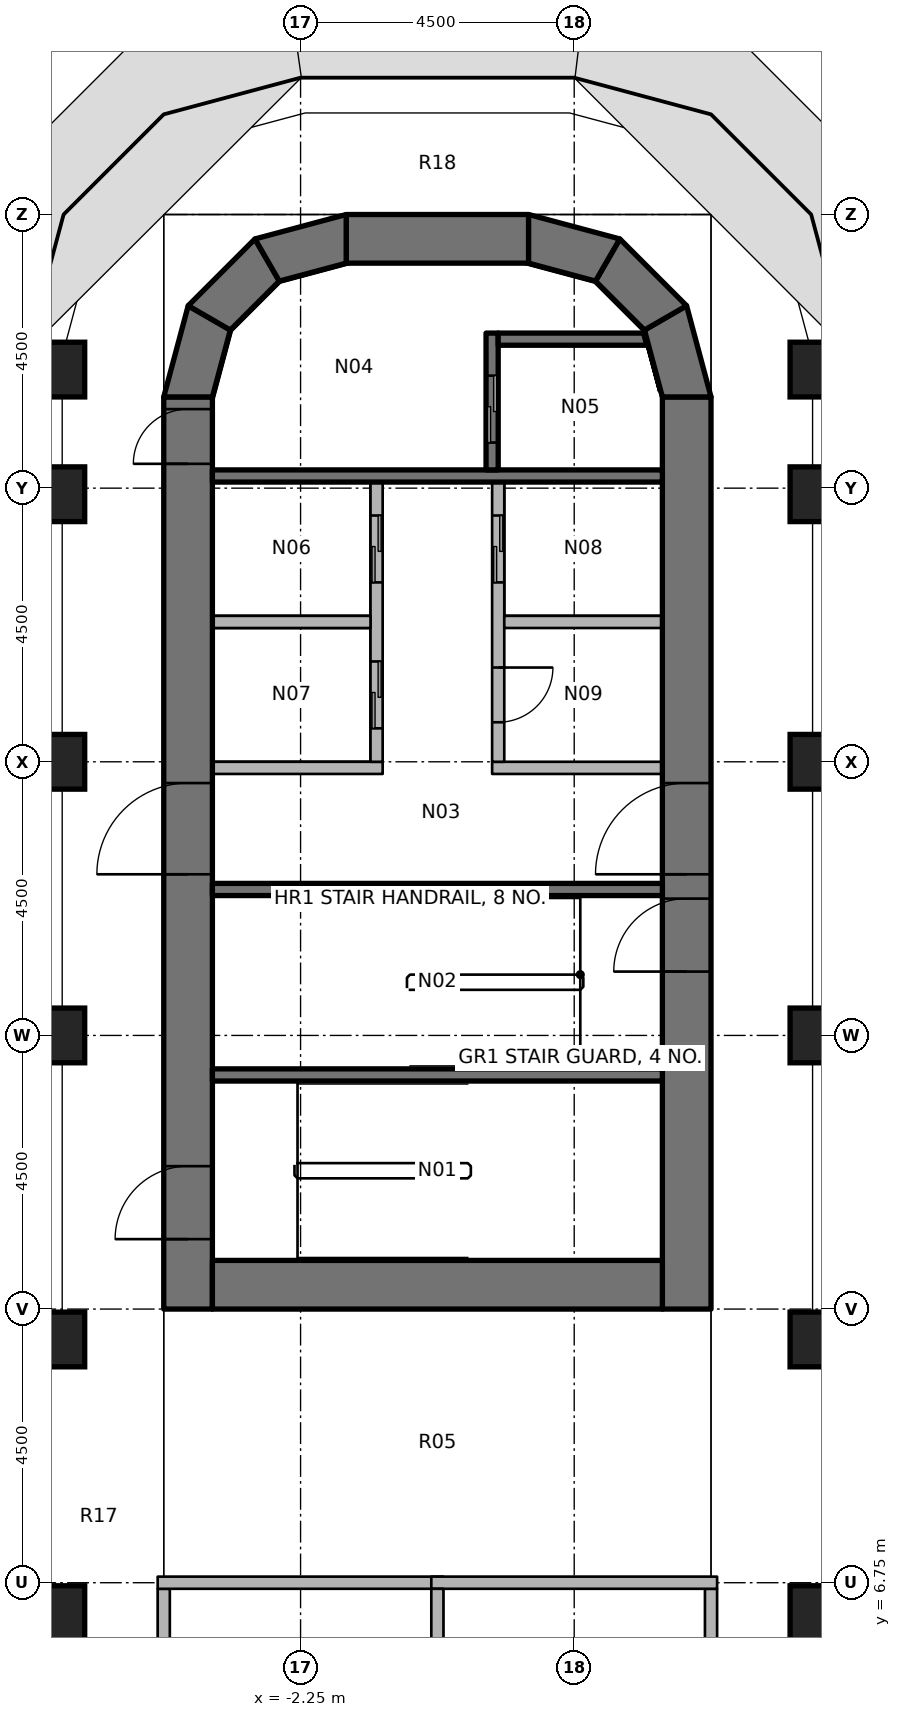
"""IFC4 building model, lengths in metres.
Left out: names, types, materials, properties, quantities, classifications, styles, units other than length and angle.
Written with IfcOpenShell. Run it as: python <this file> out.ifc"""

import sys

from ifc_helpers import new_model, si_unit, direction, frame, frame_2d, origin, origin_2d, place, context, subcontext, project, spatial, polyline, rectangle, outline, extrude, element, fill, save


model = new_model("IFC4")
c1 = context("Model", 3, precision=1e-05, world=origin(), true_north=direction((0.0, 1.0)))
c2 = subcontext(c1, "Body", "Model", "MODEL_VIEW")
j1 = project(units=[si_unit("LENGTHUNIT", "METRE"), si_unit("PLANEANGLEUNIT", "RADIAN")], contexts=[c1])
p1 = place(None, origin())
s1 = spatial("IfcSite", under=j1, at=p1, CompositionType="ELEMENT")
p2 = place(p1, origin())
s2 = spatial("IfcBuilding", under=s1, at=p2, CompositionType="ELEMENT")
p3 = place(p2, frame((0.0, 0.0, 109.4)))
s3 = spatial("IfcBuildingStorey", under=s2, at=p3, CompositionType="ELEMENT", Elevation=109.4)
for number, where, z_axis, x_axis in (
    (1, (-6.25, 6.25, 0.0), (0.0, 0.0, 1.0), (1.0, 0.0, 0.0)),
    (2, (-6.25, 10.75, 0.0), (0.0, 0.0, 1.0), (1.0, 0.0, 0.0)),
    (3, (-6.25, 15.75, 0.0), (0.0, 0.0, 1.0), (1.0, 0.0, 0.0)),
    (4, (-6.25, 20.25, 0.0), (0.0, 0.0, 1.0), (1.0, 0.0, 0.0)),
    (5, (-6.25, 24.65, 0.0), (0.0, 0.0, 1.0), (1.0, 0.0, 0.0)),
    (6, (-6.25, 26.7, 0.0), (0.0, 0.0, 1.0), (1.0, 0.0, 0.0)),
    (7, (6.25, 6.25, 0.0), (0.0, 0.0, 1.0), (1.0, 0.0, 0.0)),
    (8, (6.25, 10.75, 0.0), (0.0, 0.0, 1.0), (1.0, 0.0, 0.0)),
    (9, (6.25, 15.75, 0.0), (0.0, 0.0, 1.0), (1.0, 0.0, 0.0)),
    (10, (6.25, 20.25, 0.0), (0.0, 0.0, 1.0), (1.0, 0.0, 0.0)),
    (11, (6.25, 24.65, 0.0), (0.0, 0.0, 1.0), (1.0, 0.0, 0.0)),
    (12, (6.25, 26.7, 0.0), (0.0, 0.0, 1.0), (1.0, 0.0, 0.0)),
):
    element("IfcColumn", number, at=place(p3, frame(where, z_axis=z_axis, x_axis=x_axis)), inside=s3, PredefinedType="COLUMN", context=c2, shape_type="SweptSolid", body=[
        extrude(rectangle(XDim=0.9, YDim=0.9, at=origin_2d()), origin(), (0.0, 0.0, 1.0), 3.65),
    ])
p4 = place(p3, frame((-4.1, 11.25, 0.0), z_axis=(0.0, 0.0, 1.0), x_axis=(0.0, 1.0, 0.0)))
e13 = element("IfcWall", 13, at=p4, inside=s3, PredefinedType="SHEAR", context=c2, shape_type="SweptSolid", body=[
    extrude(rectangle(XDim=15.0, YDim=0.8, at=frame_2d((7.5, 0.0))), origin(), (0.0, 0.0, 1.0), 3.8),
])
p5 = place(p4, frame((7.15, 0.0, 0.0)))
e14 = element("IfcOpeningElement", 14, at=p5, cuts=e13, PredefinedType="OPENING", context=c2, shape_type="SweptSolid", body=[
    extrude(rectangle(XDim=1.5, YDim=2.3, at=frame_2d((0.75, 1.15))), frame((0.0, 0.41, 0.0), z_axis=(0.0, -1.0, 0.0), x_axis=(1.0, 0.0, 0.0)), (0.0, 0.0, 1.0), 0.82),
])
p6 = place(p4, frame((13.9, 0.0, 0.0)))
e15 = element("IfcOpeningElement", 15, at=p6, cuts=e13, PredefinedType="OPENING", context=c2, shape_type="SweptSolid", body=[
    extrude(rectangle(XDim=0.9, YDim=2.1, at=frame_2d((0.45, 1.05))), frame((0.0, 0.41, 0.0), z_axis=(0.0, -1.0, 0.0), x_axis=(1.0, 0.0, 0.0)), (0.0, 0.0, 1.0), 0.82),
])
p7 = place(p4, frame((1.15, 0.0, 0.0)))
e16 = element("IfcOpeningElement", 16, at=p7, cuts=e13, PredefinedType="OPENING", context=c2, shape_type="SweptSolid", body=[
    extrude(rectangle(XDim=1.2, YDim=2.1, at=frame_2d((0.6, 1.05))), frame((0.0, 0.41, 0.0), z_axis=(0.0, -1.0, 0.0), x_axis=(1.0, 0.0, 0.0)), (0.0, 0.0, 1.0), 0.82),
])
p8 = place(p3, frame((4.1, 11.25, 0.0), z_axis=(0.0, 0.0, 1.0), x_axis=(0.0, 1.0, 0.0)))
e17 = element("IfcWall", 17, at=p8, inside=s3, PredefinedType="SHEAR", context=c2, shape_type="SweptSolid", body=[
    extrude(rectangle(XDim=15.0, YDim=0.8, at=frame_2d((7.5, 0.0))), origin(), (0.0, 0.0, 1.0), 3.8),
])
p9 = place(p8, frame((7.15, 0.0, 0.0)))
e18 = element("IfcOpeningElement", 18, at=p9, cuts=e17, PredefinedType="OPENING", context=c2, shape_type="SweptSolid", body=[
    extrude(rectangle(XDim=1.5, YDim=2.3, at=frame_2d((0.75, 1.15))), frame((0.0, 0.41, 0.0), z_axis=(0.0, -1.0, 0.0), x_axis=(1.0, 0.0, 0.0)), (0.0, 0.0, 1.0), 0.82),
])
p10 = place(p8, frame((5.55, 0.0, 0.0)))
e19 = element("IfcOpeningElement", 19, at=p10, cuts=e17, PredefinedType="OPENING", context=c2, shape_type="SweptSolid", body=[
    extrude(rectangle(XDim=1.2, YDim=2.1, at=frame_2d((0.6, 1.05))), frame((0.0, 0.41, 0.0), z_axis=(0.0, -1.0, 0.0), x_axis=(1.0, 0.0, 0.0)), (0.0, 0.0, 1.0), 0.82),
])
p11 = place(p3, frame((-3.7, 11.65, 0.0), z_axis=(0.0, 0.0, 1.0), x_axis=(1.0, 0.0, 0.0)))
e20 = element("IfcWall", 20, at=p11, inside=s3, PredefinedType="SHEAR", context=c2, shape_type="SweptSolid", body=[
    extrude(rectangle(XDim=7.4, YDim=0.8, at=frame_2d((3.7, 0.0))), origin(), (0.0, 0.0, 1.0), 3.8),
])
p12 = place(p3, frame((-1.5, 28.85, 0.0), z_axis=(0.0, 0.0, 1.0), x_axis=(1.0, 0.0, 0.0)))
e21 = element("IfcWall", 21, at=p12, inside=s3, PredefinedType="SHEAR", context=c2, shape_type="SweptSolid", body=[
    extrude(rectangle(XDim=3.0, YDim=0.8, at=frame_2d((1.5, 0.0))), origin(), (0.0, 0.0, 1.0), 3.8),
])
p13 = place(p3, origin())
e22 = element("IfcWall", 22, at=p13, inside=s3, PredefinedType="SHEAR", context=c2, shape_type="SweptSolid", body=[
    extrude(outline(polyline([(-4.5, 26.25), (-4.098, 27.75), (-3.405, 27.35), (-3.7, 26.25), (-4.5, 26.25)])), origin(), (0.0, 0.0, 1.0), 3.8),
])
p14 = place(p3, origin())
e23 = element("IfcWall", 23, at=p14, inside=s3, PredefinedType="SHEAR", context=c2, shape_type="SweptSolid", body=[
    extrude(outline(polyline([(-4.098, 27.75), (-3.0, 28.848), (-2.6, 28.155), (-3.405, 27.35), (-4.098, 27.75)])), origin(), (0.0, 0.0, 1.0), 3.8),
])
p15 = place(p3, origin())
e24 = element("IfcWall", 24, at=p15, inside=s3, PredefinedType="SHEAR", context=c2, shape_type="SweptSolid", body=[
    extrude(outline(polyline([(-3.0, 28.848), (-1.5, 29.25), (-1.5, 28.45), (-2.6, 28.155), (-3.0, 28.848)])), origin(), (0.0, 0.0, 1.0), 3.8),
])
p16 = place(p3, origin())
e25 = element("IfcWall", 25, at=p16, inside=s3, PredefinedType="SHEAR", context=c2, shape_type="SweptSolid", body=[
    extrude(outline(polyline([(4.5, 26.25), (4.098, 27.75), (3.405, 27.35), (3.7, 26.25), (4.5, 26.25)])), origin(), (0.0, 0.0, 1.0), 3.8),
])
p17 = place(p3, origin())
e26 = element("IfcWall", 26, at=p17, inside=s3, PredefinedType="SHEAR", context=c2, shape_type="SweptSolid", body=[
    extrude(outline(polyline([(4.098, 27.75), (3.0, 28.848), (2.6, 28.155), (3.405, 27.35), (4.098, 27.75)])), origin(), (0.0, 0.0, 1.0), 3.8),
])
p18 = place(p3, origin())
e27 = element("IfcWall", 27, at=p18, inside=s3, PredefinedType="SHEAR", context=c2, shape_type="SweptSolid", body=[
    extrude(outline(polyline([(3.0, 28.848), (1.5, 29.25), (1.5, 28.45), (2.6, 28.155), (3.0, 28.848)])), origin(), (0.0, 0.0, 1.0), 3.8),
])
p19 = place(p3, frame((-3.7, 24.95, 0.0), z_axis=(0.0, 0.0, 1.0), x_axis=(1.0, 0.0, 0.0)))
e28 = element("IfcWall", 28, at=p19, inside=s3, PredefinedType="SHEAR", context=c2, shape_type="SweptSolid", body=[
    extrude(rectangle(XDim=7.4, YDim=0.2, at=frame_2d((3.7, 0.0))), origin(), (0.0, 0.0, 1.0), 3.65),
])
p20 = place(p3, frame((0.9, 27.3, 0.0), z_axis=(0.0, 0.0, 1.0), x_axis=(0.0, -1.0, 0.0)))
e29 = element("IfcWall", 29, at=p20, inside=s3, PredefinedType="SHEAR", context=c2, shape_type="SweptSolid", body=[
    extrude(rectangle(XDim=2.25, YDim=0.2, at=frame_2d((1.125, 0.0))), origin(), (0.0, 0.0, 1.0), 3.65),
])
p21 = place(p20, frame((0.7, 0.0, 0.0)))
e30 = element("IfcOpeningElement", 30, at=p21, cuts=e29, PredefinedType="OPENING", context=c2, shape_type="SweptSolid", body=[
    extrude(rectangle(XDim=1.1, YDim=2.3, at=frame_2d((0.55, 1.15))), frame((0.0, 0.11, 0.0), z_axis=(0.0, -1.0, 0.0), x_axis=(1.0, 0.0, 0.0)), (0.0, 0.0, 1.0), 0.22),
])
p22 = place(p3, origin())
e31 = element("IfcWall", 31, at=p22, inside=s3, PredefinedType="SHEAR", context=c2, shape_type="SweptSolid", body=[
    extrude(outline(polyline([(1.0, 27.1), (3.444, 27.1), (3.39, 27.3), (1.0, 27.3), (1.0, 27.1)])), origin(), (0.0, 0.0, 1.0), 3.65),
])
for number, where, z_axis, x_axis in (
    (32, (-3.7, 18.15, 0.0), (0.0, 0.0, 1.0), (1.0, 0.0, 0.0)),
    (33, (-3.7, 15.1, 0.0), (0.0, 0.0, 1.0), (1.0, 0.0, 0.0)),
):
    element("IfcWall", number, at=place(p3, frame(where, z_axis=z_axis, x_axis=x_axis)), inside=s3, PredefinedType="SHEAR", context=c2, shape_type="SweptSolid", body=[
        extrude(rectangle(XDim=7.4, YDim=0.2, at=frame_2d((3.7, 0.0))), origin(), (0.0, 0.0, 1.0), 3.65),
    ])
p23 = place(p3, frame((-3.7, 20.15, 0.0), z_axis=(0.0, 0.0, 1.0), x_axis=(1.0, 0.0, 0.0)))
e34 = element("IfcWall", 34, at=p23, inside=s3, PredefinedType="PARTITIONING", context=c2, shape_type="SweptSolid", body=[
    extrude(rectangle(XDim=2.8, YDim=0.2, at=frame_2d((1.4, 0.0))), origin(), (0.0, 0.0, 1.0), 3.65),
])
p24 = place(p3, frame((-1.0, 24.85, 0.0), z_axis=(0.0, 0.0, 1.0), x_axis=(0.0, -1.0, 0.0)))
e35 = element("IfcWall", 35, at=p24, inside=s3, PredefinedType="PARTITIONING", context=c2, shape_type="SweptSolid", body=[
    extrude(rectangle(XDim=4.6, YDim=0.2, at=frame_2d((2.3, 0.0))), origin(), (0.0, 0.0, 1.0), 3.65),
])
p25 = place(p24, frame((0.55, 0.0, 0.0)))
e36 = element("IfcOpeningElement", 36, at=p25, cuts=e35, PredefinedType="OPENING", context=c2, shape_type="SweptSolid", body=[
    extrude(rectangle(XDim=1.1, YDim=2.3, at=frame_2d((0.55, 1.15))), frame((0.0, 0.11, 0.0), z_axis=(0.0, -1.0, 0.0), x_axis=(1.0, 0.0, 0.0)), (0.0, 0.0, 1.0), 0.22),
])
p26 = place(p24, frame((2.95, 0.0, 0.0)))
e37 = element("IfcOpeningElement", 37, at=p26, cuts=e35, PredefinedType="OPENING", context=c2, shape_type="SweptSolid", body=[
    extrude(rectangle(XDim=1.1, YDim=2.3, at=frame_2d((0.55, 1.15))), frame((0.0, 0.11, 0.0), z_axis=(0.0, -1.0, 0.0), x_axis=(1.0, 0.0, 0.0)), (0.0, 0.0, 1.0), 0.22),
])
p27 = place(p3, frame((0.9, 20.15, 0.0), z_axis=(0.0, 0.0, 1.0), x_axis=(1.0, 0.0, 0.0)))
e38 = element("IfcWall", 38, at=p27, inside=s3, PredefinedType="PARTITIONING", context=c2, shape_type="SweptSolid", body=[
    extrude(rectangle(XDim=2.8, YDim=0.2, at=frame_2d((1.4, 0.0))), origin(), (0.0, 0.0, 1.0), 3.65),
])
p28 = place(p3, frame((1.0, 24.85, 0.0), z_axis=(0.0, 0.0, 1.0), x_axis=(0.0, -1.0, 0.0)))
e39 = element("IfcWall", 39, at=p28, inside=s3, PredefinedType="PARTITIONING", context=c2, shape_type="SweptSolid", body=[
    extrude(rectangle(XDim=4.6, YDim=0.2, at=frame_2d((2.3, 0.0))), origin(), (0.0, 0.0, 1.0), 3.65),
])
p29 = place(p28, frame((0.55, 0.0, 0.0)))
e40 = element("IfcOpeningElement", 40, at=p29, cuts=e39, PredefinedType="OPENING", context=c2, shape_type="SweptSolid", body=[
    extrude(rectangle(XDim=1.1, YDim=2.3, at=frame_2d((0.55, 1.15))), frame((0.0, 0.11, 0.0), z_axis=(0.0, -1.0, 0.0), x_axis=(1.0, 0.0, 0.0)), (0.0, 0.0, 1.0), 0.22),
])
p30 = place(p28, frame((3.05, 0.0, 0.0)))
e41 = element("IfcOpeningElement", 41, at=p30, cuts=e39, PredefinedType="OPENING", context=c2, shape_type="SweptSolid", body=[
    extrude(rectangle(XDim=0.9, YDim=2.1, at=frame_2d((0.45, 1.05))), frame((0.0, 0.11, 0.0), z_axis=(0.0, -1.0, 0.0), x_axis=(1.0, 0.0, 0.0)), (0.0, 0.0, 1.0), 0.22),
])
for number, where, z_axis, x_axis in (
    (42, (-3.7, 22.55, 0.0), (0.0, 0.0, 1.0), (1.0, 0.0, 0.0)),
    (43, (1.1, 22.55, 0.0), (0.0, 0.0, 1.0), (1.0, 0.0, 0.0)),
):
    element("IfcWall", number, at=place(p3, frame(where, z_axis=z_axis, x_axis=x_axis)), inside=s3, PredefinedType="PARTITIONING", context=c2, shape_type="SweptSolid", body=[
        extrude(rectangle(XDim=2.6, YDim=0.2, at=frame_2d((1.3, 0.0))), origin(), (0.0, 0.0, 1.0), 3.65),
    ])
p31 = place(p3, frame((-4.5, 6.65, 0.0), z_axis=(0.0, 0.0, 1.0), x_axis=(0.0, -1.0, 0.0)))
e44 = element("IfcWall", 44, at=p31, inside=s3, PredefinedType="PARTITIONING", context=c2, shape_type="SweptSolid", body=[
    extrude(rectangle(XDim=6.55, YDim=0.2, at=frame_2d((3.275, 0.0))), origin(), (0.0, 0.0, 1.0), 2.738),
])
p32 = place(p31, frame((2.775, 0.0, 0.0)))
e45 = element("IfcOpeningElement", 45, at=p32, cuts=e44, PredefinedType="OPENING", context=c2, shape_type="SweptSolid", body=[
    extrude(rectangle(XDim=1.0, YDim=2.1, at=frame_2d((0.5, 1.05))), frame((0.0, 0.11, 0.0), z_axis=(0.0, -1.0, 0.0), x_axis=(1.0, 0.0, 0.0)), (0.0, 0.0, 1.0), 0.22),
])
p33 = place(p3, frame((4.5, 0.1, 0.0), z_axis=(0.0, 0.0, 1.0), x_axis=(0.0, 1.0, 0.0)))
e46 = element("IfcWall", 46, at=p33, inside=s3, PredefinedType="PARTITIONING", context=c2, shape_type="SweptSolid", body=[
    extrude(rectangle(XDim=6.55, YDim=0.2, at=frame_2d((3.275, 0.0))), origin(), (0.0, 0.0, 1.0), 2.738),
])
p34 = place(p33, frame((2.775, 0.0, 0.0)))
e47 = element("IfcOpeningElement", 47, at=p34, cuts=e46, PredefinedType="OPENING", context=c2, shape_type="SweptSolid", body=[
    extrude(rectangle(XDim=1.0, YDim=2.1, at=frame_2d((0.5, 1.05))), frame((0.0, 0.11, 0.0), z_axis=(0.0, -1.0, 0.0), x_axis=(1.0, 0.0, 0.0)), (0.0, 0.0, 1.0), 0.22),
])
for number, where, z_axis, x_axis in (
    (48, (-4.6, 6.75, 0.0), (0.0, 0.0, 1.0), (1.0, 0.0, 0.0)),
    (49, (-0.1, 6.75, 0.0), (0.0, 0.0, 1.0), (1.0, 0.0, 0.0)),
):
    element("IfcWall", number, at=place(p3, frame(where, z_axis=z_axis, x_axis=x_axis)), inside=s3, PredefinedType="PARTITIONING", context=c2, shape_type="SweptSolid", body=[
        extrude(rectangle(XDim=4.7, YDim=0.2, at=frame_2d((2.35, 0.0))), origin(), (0.0, 0.0, 1.0), 2.738),
    ])
p35 = place(p3, frame((0.0, 0.1, 0.0), z_axis=(0.0, 0.0, 1.0), x_axis=(0.0, 1.0, 0.0)))
e50 = element("IfcWall", 50, at=p35, inside=s3, PredefinedType="PARTITIONING", context=c2, shape_type="SweptSolid", body=[
    extrude(rectangle(XDim=6.55, YDim=0.2, at=frame_2d((3.275, 0.0))), origin(), (0.0, 0.0, 1.0), 2.738),
])
p36 = place(p5, origin())
e51 = element("IfcDoor", 51, at=p36, inside=s3, OperationType="DOUBLE_DOOR_SINGLE_SWING", PredefinedType="DOOR", context=c2, shape_type="SweptSolid", body=[
    extrude(rectangle(XDim=1.5, YDim=2.3, at=frame_2d((0.75, 1.15))), frame((0.0, 0.025, 0.0), z_axis=(0.0, -1.0, 0.0), x_axis=(1.0, 0.0, 0.0)), (0.0, 0.0, 1.0), 0.05),
])
fill(e14, e51)
p37 = place(p9, origin())
e52 = element("IfcDoor", 52, at=p37, inside=s3, OperationType="DOUBLE_DOOR_SINGLE_SWING", PredefinedType="DOOR", context=c2, shape_type="SweptSolid", body=[
    extrude(rectangle(XDim=1.5, YDim=2.3, at=frame_2d((0.75, 1.15))), frame((0.0, 0.025, 0.0), z_axis=(0.0, -1.0, 0.0), x_axis=(1.0, 0.0, 0.0)), (0.0, 0.0, 1.0), 0.05),
])
fill(e18, e52)
p38 = place(p6, origin())
e53 = element("IfcDoor", 53, at=p38, inside=s3, OperationType="SINGLE_SWING_RIGHT", PredefinedType="DOOR", context=c2, shape_type="SweptSolid", body=[
    extrude(rectangle(XDim=0.9, YDim=2.1, at=frame_2d((0.45, 1.05))), frame((0.0, 0.025, 0.0), z_axis=(0.0, -1.0, 0.0), x_axis=(1.0, 0.0, 0.0)), (0.0, 0.0, 1.0), 0.05),
])
fill(e15, e53)
p39 = place(p10, origin())
e54 = element("IfcDoor", 54, at=p39, inside=s3, OperationType="SINGLE_SWING_RIGHT", PredefinedType="DOOR", context=c2, shape_type="SweptSolid", body=[
    extrude(rectangle(XDim=1.2, YDim=2.1, at=frame_2d((0.6, 1.05))), frame((0.0, 0.025, 0.0), z_axis=(0.0, -1.0, 0.0), x_axis=(1.0, 0.0, 0.0)), (0.0, 0.0, 1.0), 0.05),
])
fill(e19, e54)
p40 = place(p7, origin())
e55 = element("IfcDoor", 55, at=p40, inside=s3, OperationType="SINGLE_SWING_LEFT", PredefinedType="DOOR", context=c2, shape_type="SweptSolid", body=[
    extrude(rectangle(XDim=1.2, YDim=2.1, at=frame_2d((0.6, 1.05))), frame((0.0, 0.025, 0.0), z_axis=(0.0, -1.0, 0.0), x_axis=(1.0, 0.0, 0.0)), (0.0, 0.0, 1.0), 0.05),
])
fill(e16, e55)
p41 = place(p21, origin())
e56 = element("IfcDoor", 56, at=p41, inside=s3, OperationType="DOUBLE_DOOR_SLIDING", PredefinedType="DOOR", context=c2, shape_type="SweptSolid", body=[
    extrude(rectangle(XDim=1.1, YDim=2.3, at=frame_2d((0.55, 1.15))), frame((0.0, 0.025, 0.0), z_axis=(0.0, -1.0, 0.0), x_axis=(1.0, 0.0, 0.0)), (0.0, 0.0, 1.0), 0.05),
])
fill(e30, e56)
p42 = place(p25, origin())
e57 = element("IfcDoor", 57, at=p42, inside=s3, OperationType="DOUBLE_DOOR_SLIDING", PredefinedType="DOOR", context=c2, shape_type="SweptSolid", body=[
    extrude(rectangle(XDim=1.1, YDim=2.3, at=frame_2d((0.55, 1.15))), frame((0.0, 0.025, 0.0), z_axis=(0.0, -1.0, 0.0), x_axis=(1.0, 0.0, 0.0)), (0.0, 0.0, 1.0), 0.05),
])
fill(e36, e57)
p43 = place(p26, origin())
e58 = element("IfcDoor", 58, at=p43, inside=s3, OperationType="DOUBLE_DOOR_SLIDING", PredefinedType="DOOR", context=c2, shape_type="SweptSolid", body=[
    extrude(rectangle(XDim=1.1, YDim=2.3, at=frame_2d((0.55, 1.15))), frame((0.0, 0.025, 0.0), z_axis=(0.0, -1.0, 0.0), x_axis=(1.0, 0.0, 0.0)), (0.0, 0.0, 1.0), 0.05),
])
fill(e37, e58)
p44 = place(p29, origin())
e59 = element("IfcDoor", 59, at=p44, inside=s3, OperationType="DOUBLE_DOOR_SLIDING", PredefinedType="DOOR", context=c2, shape_type="SweptSolid", body=[
    extrude(rectangle(XDim=1.1, YDim=2.3, at=frame_2d((0.55, 1.15))), frame((0.0, 0.025, 0.0), z_axis=(0.0, -1.0, 0.0), x_axis=(1.0, 0.0, 0.0)), (0.0, 0.0, 1.0), 0.05),
])
fill(e40, e59)
p45 = place(p30, origin())
e60 = element("IfcDoor", 60, at=p45, inside=s3, OperationType="SINGLE_SWING_RIGHT", PredefinedType="DOOR", context=c2, shape_type="SweptSolid", body=[
    extrude(rectangle(XDim=0.9, YDim=2.1, at=frame_2d((0.45, 1.05))), frame((0.0, 0.025, 0.0), z_axis=(0.0, -1.0, 0.0), x_axis=(1.0, 0.0, 0.0)), (0.0, 0.0, 1.0), 0.05),
])
fill(e41, e60)
save(model, sys.argv[1])
